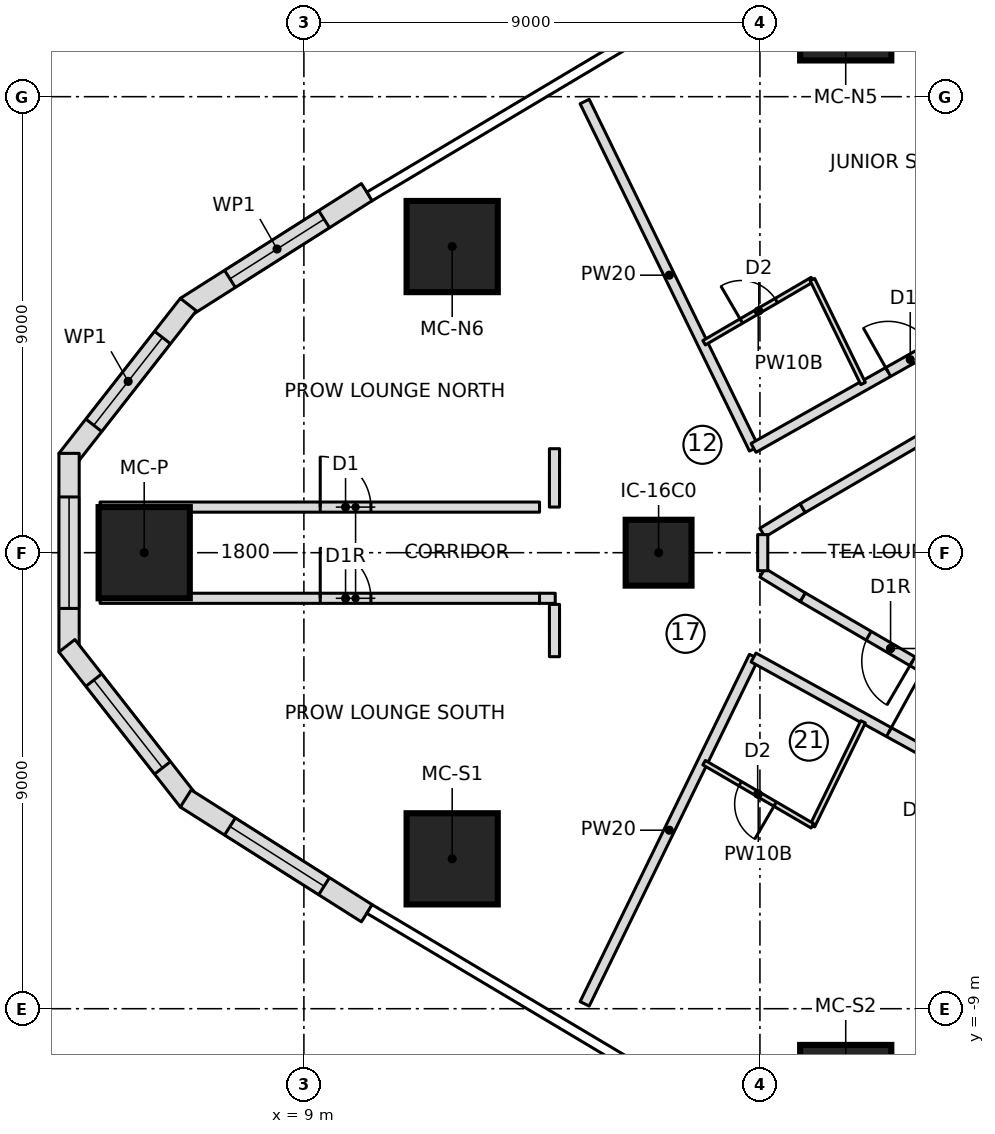
"""IFC4 building model, lengths in metres.
Left out: names, types, materials, properties, quantities, classifications, styles, units other than length and angle.
Written with IfcOpenShell. Run it as: python <this file> out.ifc"""

import sys

from ifc_helpers import new_model, si_unit, direction, frame, frame_2d, origin, origin_2d, place, context, subcontext, project, spatial, polyline, rectangle, outline, extrude, element, fill, save


model = new_model("IFC4")
c1 = context("Model", 3, precision=1e-05, world=origin(), true_north=direction((0.0, 1.0)))
c2 = subcontext(c1, "Body", "Model", "MODEL_VIEW")
j1 = project(units=[si_unit("LENGTHUNIT", "METRE"), si_unit("PLANEANGLEUNIT", "RADIAN")], contexts=[c1])
p1 = place(None, origin())
s1 = spatial("IfcSite", under=j1, at=p1, CompositionType="ELEMENT")
p2 = place(p1, origin())
s2 = spatial("IfcBuilding", under=s1, at=p2, CompositionType="ELEMENT")
p3 = place(p2, frame((0.0, 0.0, 43.15)))
s3 = spatial("IfcBuildingStorey", under=s2, at=p3, CompositionType="ELEMENT", Elevation=43.15)
for number, where, z_axis, x_axis in (
    (1, (5.848, 0.0, 0.0), (0.0, 0.0, 1.0), (1.0, 0.0, 0.0)),
    (2, (11.927, -6.042, 0.0), (0.0, 0.0, 1.0), (1.0, 0.0, 0.0)),
    (3, (19.693, -10.615, 0.0), (0.0, 0.0, 1.0), (1.0, 0.0, 0.0)),
    (4, (19.693, 10.615, 0.0), (0.0, 0.0, 1.0), (1.0, 0.0, 0.0)),
    (5, (11.927, 6.042, 0.0), (0.0, 0.0, 1.0), (1.0, 0.0, 0.0)),
):
    element("IfcColumn", number, at=place(p3, frame(where, z_axis=z_axis, x_axis=x_axis)), inside=s3, PredefinedType="COLUMN", context=c2, shape_type="SweptSolid", body=[
        extrude(rectangle(XDim=1.8, YDim=1.8, at=origin_2d()), origin(), (0.0, 0.0, 1.0), 3.55),
    ])
p4 = place(p3, frame((16.0, 0.0, 0.0), z_axis=(0.0, 0.0, 1.0), x_axis=(1.0, 0.0, 0.0)))
e6 = element("IfcColumn", 6, at=p4, inside=s3, PredefinedType="COLUMN", context=c2, shape_type="SweptSolid", body=[
    extrude(rectangle(XDim=1.3, YDim=1.3, at=origin_2d()), origin(), (0.0, 0.0, 1.0), 3.55),
])
p5 = place(p3, frame((10.242, 7.116, 0.0), z_axis=(0.0, 0.0, 1.0), x_axis=(-0.844551578623, -0.535474211372, 0.0)))
e7 = element("IfcWall", 7, at=p5, inside=s3, PredefinedType="NOTDEFINED", context=c2, shape_type="SweptSolid", body=[
    extrude(outline(polyline([(0.0, -0.2), (4.23, -0.2), (4.162, 0.2), (0.0, 0.2), (0.0, -0.2)])), origin(), (0.0, 0.0, 1.0), 3.25),
])
p6 = place(p5, frame((0.998, 0.0, 0.6)))
e8 = element("IfcOpeningElement", 8, at=p6, cuts=e7, PredefinedType="OPENING", context=c2, shape_type="SweptSolid", body=[
    extrude(outline(polyline([(0.0, 1.35), (0.084, 1.771), (0.322, 2.128), (0.679, 2.366), (1.1, 2.45), (1.521, 2.366), (1.878, 2.128), (2.116, 1.771), (2.2, 1.35), (2.2, 1.1), (2.116, 0.679), (1.878, 0.322), (1.521, 0.084), (1.1, 0.0), (0.679, 0.084), (0.322, 0.322), (0.084, 0.679), (0.0, 1.1), (0.0, 1.35)])), frame((0.0, 0.21, 0.0), z_axis=(0.0, -1.0, 0.0), x_axis=(1.0, 0.0, 0.0)), (0.0, 0.0, 1.0), 0.42),
])
p7 = place(p3, frame((6.698, 4.87, 0.0), z_axis=(0.0, 0.0, 1.0), x_axis=(-0.616586647779, -0.787287054245, 0.0)))
e9 = element("IfcWall", 9, at=p7, inside=s3, PredefinedType="NOTDEFINED", context=c2, shape_type="SweptSolid", body=[
    extrude(outline(polyline([(-0.034, -0.2), (3.852, -0.2), (3.714, 0.2), (0.034, 0.2), (-0.034, -0.2)])), origin(), (0.0, 0.0, 1.0), 3.25),
])
p8 = place(p7, frame((0.792, 0.0, 0.6)))
e10 = element("IfcOpeningElement", 10, at=p8, cuts=e9, PredefinedType="OPENING", context=c2, shape_type="SweptSolid", body=[
    extrude(outline(polyline([(0.0, 1.35), (0.084, 1.771), (0.322, 2.128), (0.679, 2.366), (1.1, 2.45), (1.521, 2.366), (1.878, 2.128), (2.116, 1.771), (2.2, 1.35), (2.2, 1.1), (2.116, 0.679), (1.878, 0.322), (1.521, 0.084), (1.1, 0.0), (0.679, 0.084), (0.322, 0.322), (0.084, 0.679), (0.0, 1.1), (0.0, 1.35)])), frame((0.0, 0.21, 0.0), z_axis=(0.0, -1.0, 0.0), x_axis=(1.0, 0.0, 0.0)), (0.0, 0.0, 1.0), 0.42),
])
p9 = place(p3, frame((4.365, 1.891, 0.0), z_axis=(0.0, 0.0, 1.0), x_axis=(0.0, -1.0, 0.0)))
e11 = element("IfcWall", 11, at=p9, inside=s3, PredefinedType="NOTDEFINED", context=c2, shape_type="SweptSolid", body=[
    extrude(outline(polyline([(-0.069, -0.2), (3.852, -0.2), (3.714, 0.2), (0.069, 0.2), (-0.069, -0.2)])), origin(), (0.0, 0.0, 1.0), 3.25),
])
p10 = place(p9, frame((0.792, 0.0, 0.6)))
e12 = element("IfcOpeningElement", 12, at=p10, cuts=e11, PredefinedType="OPENING", context=c2, shape_type="SweptSolid", body=[
    extrude(outline(polyline([(0.0, 1.35), (0.084, 1.771), (0.322, 2.128), (0.679, 2.366), (1.1, 2.45), (1.521, 2.366), (1.878, 2.128), (2.116, 1.771), (2.2, 1.35), (2.2, 1.1), (2.116, 0.679), (1.878, 0.322), (1.521, 0.084), (1.1, 0.0), (0.679, 0.084), (0.322, 0.322), (0.084, 0.679), (0.0, 1.1), (0.0, 1.35)])), frame((0.0, 0.21, 0.0), z_axis=(0.0, -1.0, 0.0), x_axis=(1.0, 0.0, 0.0)), (0.0, 0.0, 1.0), 0.42),
])
p11 = place(p3, frame((4.365, -1.891, 0.0), z_axis=(0.0, 0.0, 1.0), x_axis=(0.616586647779, -0.787287054245, 0.0)))
e13 = element("IfcWall", 13, at=p11, inside=s3, PredefinedType="NOTDEFINED", context=c2, shape_type="SweptSolid", body=[
    extrude(outline(polyline([(-0.069, -0.2), (3.817, -0.2), (3.749, 0.2), (0.069, 0.2), (-0.069, -0.2)])), origin(), (0.0, 0.0, 1.0), 3.25),
])
p12 = place(p11, frame((0.792, 0.0, 0.6)))
e14 = element("IfcOpeningElement", 14, at=p12, cuts=e13, PredefinedType="OPENING", context=c2, shape_type="SweptSolid", body=[
    extrude(outline(polyline([(0.0, 1.35), (0.084, 1.771), (0.322, 2.128), (0.679, 2.366), (1.1, 2.45), (1.521, 2.366), (1.878, 2.128), (2.116, 1.771), (2.2, 1.35), (2.2, 1.1), (2.116, 0.679), (1.878, 0.322), (1.521, 0.084), (1.1, 0.0), (0.679, 0.084), (0.322, 0.322), (0.084, 0.679), (0.0, 1.1), (0.0, 1.35)])), frame((0.0, 0.21, 0.0), z_axis=(0.0, -1.0, 0.0), x_axis=(1.0, 0.0, 0.0)), (0.0, 0.0, 1.0), 0.42),
])
p13 = place(p3, frame((6.698, -4.87, 0.0), z_axis=(0.0, 0.0, 1.0), x_axis=(0.844551578623, -0.535474211372, 0.0)))
e15 = element("IfcWall", 15, at=p13, inside=s3, PredefinedType="NOTDEFINED", context=c2, shape_type="SweptSolid", body=[
    extrude(outline(polyline([(-0.034, -0.2), (4.196, -0.2), (4.196, 0.2), (0.034, 0.2), (-0.034, -0.2)])), origin(), (0.0, 0.0, 1.0), 3.25),
])
p14 = place(p13, frame((0.998, 0.0, 0.6)))
e16 = element("IfcOpeningElement", 16, at=p14, cuts=e15, PredefinedType="OPENING", context=c2, shape_type="SweptSolid", body=[
    extrude(outline(polyline([(0.0, 1.35), (0.084, 1.771), (0.322, 2.128), (0.679, 2.366), (1.1, 2.45), (1.521, 2.366), (1.878, 2.128), (2.116, 1.771), (2.2, 1.35), (2.2, 1.1), (2.116, 0.679), (1.878, 0.322), (1.521, 0.084), (1.1, 0.0), (0.679, 0.084), (0.322, 0.322), (0.084, 0.679), (0.0, 1.1), (0.0, 1.35)])), frame((0.0, 0.21, 0.0), z_axis=(0.0, -1.0, 0.0), x_axis=(1.0, 0.0, 0.0)), (0.0, 0.0, 1.0), 0.42),
])
p15 = place(p3, frame((17.882, 2.05, 0.0), z_axis=(0.0, 0.0, 1.0), x_axis=(-0.438213564788, 0.898870887078, 0.0)))
e17 = element("IfcWall", 17, at=p15, inside=s3, PredefinedType="PARTITIONING", context=c2, shape_type="SweptSolid", body=[
    extrude(rectangle(XDim=7.625, YDim=0.2, at=frame_2d((3.813, 0.0))), origin(), (0.0, 0.0, 1.0), 3.25),
])
p16 = place(p3, frame((17.874, 2.068, 0.0), z_axis=(0.0, 0.0, 1.0), x_axis=(0.871165632804, 0.490989246544, 0.0)))
e18 = element("IfcWall", 18, at=p16, inside=s3, PredefinedType="PARTITIONING", context=c2, shape_type="SweptSolid", body=[
    extrude(rectangle(XDim=9.901, YDim=0.2, at=frame_2d((4.951, 0.0))), origin(), (0.0, 0.0, 1.0), 3.25),
])
p17 = place(p16, frame((3.05, 0.0, 0.0)))
e19 = element("IfcOpeningElement", 19, at=p17, cuts=e18, PredefinedType="OPENING", context=c2, shape_type="SweptSolid", body=[
    extrude(rectangle(XDim=1.0, YDim=2.1, at=frame_2d((0.5, 1.05))), frame((0.0, 0.11, 0.0), z_axis=(0.0, -1.0, 0.0), x_axis=(1.0, 0.0, 0.0)), (0.0, 0.0, 1.0), 0.22),
])
p18 = place(p3, frame((16.898, 4.144, 0.0), z_axis=(0.0, 0.0, 1.0), x_axis=(0.863707305865, 0.503993739837, 0.0)))
e20 = element("IfcWall", 20, at=p18, inside=s3, PredefinedType="PARTITIONING", context=c2, shape_type="SweptSolid", body=[
    extrude(rectangle(XDim=2.474, YDim=0.1, at=frame_2d((1.237, 0.0))), origin(), (0.0, 0.0, 1.0), 3.25),
])
p19 = place(p18, frame((0.85, 0.0, 0.0)))
e21 = element("IfcOpeningElement", 21, at=p19, cuts=e20, PredefinedType="OPENING", context=c2, shape_type="SweptSolid", body=[
    extrude(rectangle(XDim=0.8, YDim=2.1, at=frame_2d((0.4, 1.05))), frame((0.0, 0.06, 0.0), z_axis=(0.0, -1.0, 0.0), x_axis=(1.0, 0.0, 0.0)), (0.0, 0.0, 1.0), 0.12),
])
p20 = place(p3, frame((19.035, 5.39, 0.0), z_axis=(0.0, 0.0, 1.0), x_axis=(0.438122322582, -0.898915363344, 0.0)))
e22 = element("IfcWall", 22, at=p20, inside=s3, PredefinedType="PARTITIONING", context=c2, shape_type="SweptSolid", body=[
    extrude(rectangle(XDim=2.283, YDim=0.1, at=frame_2d((1.142, 0.0))), origin(), (0.0, 0.0, 1.0), 3.25),
])
p21 = place(p3, frame((14.541, -8.904, 0.0), z_axis=(0.0, 0.0, 1.0), x_axis=(0.438213564788, 0.898870887078, 0.0)))
e23 = element("IfcWall", 23, at=p21, inside=s3, PredefinedType="PARTITIONING", context=c2, shape_type="SweptSolid", body=[
    extrude(rectangle(XDim=7.625, YDim=0.2, at=frame_2d((3.813, 0.0))), origin(), (0.0, 0.0, 1.0), 3.25),
])
p22 = place(p3, frame((17.874, -2.068, 0.0), z_axis=(0.0, 0.0, 1.0), x_axis=(0.875757832755, -0.482750679305, 0.0)))
e24 = element("IfcWall", 24, at=p22, inside=s3, PredefinedType="PARTITIONING", context=c2, shape_type="SweptSolid", body=[
    extrude(rectangle(XDim=14.405, YDim=0.2, at=frame_2d((7.202, 0.0))), origin(), (0.0, 0.0, 1.0), 3.25),
])
p23 = place(p22, frame((3.05, 0.0, 0.0)))
e25 = element("IfcOpeningElement", 25, at=p23, cuts=e24, PredefinedType="OPENING", context=c2, shape_type="SweptSolid", body=[
    extrude(rectangle(XDim=1.5, YDim=2.1, at=frame_2d((0.75, 1.05))), frame((0.0, 0.11, 0.0), z_axis=(0.0, -1.0, 0.0), x_axis=(1.0, 0.0, 0.0)), (0.0, 0.0, 1.0), 0.22),
])
p24 = place(p3, frame((20.035, -3.338, 0.0), z_axis=(0.0, 0.0, 1.0), x_axis=(-0.438122322582, -0.898915363344, 0.0)))
e26 = element("IfcWall", 26, at=p24, inside=s3, PredefinedType="PARTITIONING", context=c2, shape_type="SweptSolid", body=[
    extrude(rectangle(XDim=2.283, YDim=0.1, at=frame_2d((1.142, 0.0))), origin(), (0.0, 0.0, 1.0), 3.25),
])
p25 = place(p3, frame((19.035, -5.39, 0.0), z_axis=(0.0, 0.0, 1.0), x_axis=(-0.863707305865, 0.503993739837, 0.0)))
e27 = element("IfcWall", 27, at=p25, inside=s3, PredefinedType="PARTITIONING", context=c2, shape_type="SweptSolid", body=[
    extrude(rectangle(XDim=2.474, YDim=0.1, at=frame_2d((1.237, 0.0))), origin(), (0.0, 0.0, 1.0), 3.25),
])
p26 = place(p25, frame((0.85, 0.0, 0.0)))
e28 = element("IfcOpeningElement", 28, at=p26, cuts=e27, PredefinedType="OPENING", context=c2, shape_type="SweptSolid", body=[
    extrude(rectangle(XDim=0.8, YDim=2.1, at=frame_2d((0.4, 1.05))), frame((0.0, 0.06, 0.0), z_axis=(0.0, -1.0, 0.0), x_axis=(1.0, 0.0, 0.0)), (0.0, 0.0, 1.0), 0.12),
])
p27 = place(p3, frame((22.312, -2.903, 0.0), z_axis=(0.0, 0.0, 1.0), x_axis=(-0.863710538269, 0.503988200341, 0.0)))
e29 = element("IfcWall", 29, at=p27, inside=s3, PredefinedType="PARTITIONING", context=c2, shape_type="SweptSolid", body=[
    extrude(rectangle(XDim=4.016, YDim=0.2, at=frame_2d((2.008, 0.0))), origin(), (0.0, 0.0, 1.0), 3.25),
])
p28 = place(p27, frame((1.508, 0.0, 0.0)))
e30 = element("IfcOpeningElement", 30, at=p28, cuts=e29, PredefinedType="OPENING", context=c2, shape_type="SweptSolid", body=[
    extrude(rectangle(XDim=1.0, YDim=2.1, at=frame_2d((0.5, 1.05))), frame((0.0, 0.11, 0.0), z_axis=(0.0, -1.0, 0.0), x_axis=(1.0, 0.0, 0.0)), (0.0, 0.0, 1.0), 0.22),
])
for number, where, z_axis, x_axis in (
    (31, (18.844, -0.879, 0.0), (0.0, 0.0, 1.0), (-0.854, 0.52, 0.0)),
    (32, (18.05, 0.396, 0.0), (0.0, 0.0, 1.0), (0.854, 0.52, 0.0)),
):
    element("IfcWall", number, at=place(p3, frame(where, z_axis=z_axis, x_axis=x_axis)), inside=s3, PredefinedType="PARTITIONING", context=c2, shape_type="SweptSolid", body=[
        extrude(rectangle(XDim=0.929, YDim=0.2, at=frame_2d((0.464, 0.0))), origin(), (0.0, 0.0, 1.0), 3.25),
    ])
p29 = place(p3, frame((18.844, 0.879, 0.0), z_axis=(0.0, 0.0, 1.0), x_axis=(0.863710538269, 0.503988200341, 0.0)))
e33 = element("IfcWall", 33, at=p29, inside=s3, PredefinedType="PARTITIONING", context=c2, shape_type="SweptSolid", body=[
    extrude(rectangle(XDim=4.016, YDim=0.2, at=frame_2d((2.008, 0.0))), origin(), (0.0, 0.0, 1.0), 3.25),
])
p30 = place(p3, frame((4.977, 0.9, 0.0), z_axis=(0.0, 0.0, 1.0), x_axis=(1.0, 0.0, 0.0)))
e34 = element("IfcWall", 34, at=p30, inside=s3, PredefinedType="PARTITIONING", context=c2, shape_type="SweptSolid", body=[
    extrude(rectangle(XDim=8.673, YDim=0.2, at=frame_2d((4.336, 0.0))), origin(), (0.0, 0.0, 1.0), 3.25),
])
p31 = place(p30, frame((4.345, 0.0, 0.0)))
e35 = element("IfcOpeningElement", 35, at=p31, cuts=e34, PredefinedType="OPENING", context=c2, shape_type="SweptSolid", body=[
    extrude(rectangle(XDim=1.0, YDim=2.1, at=frame_2d((0.5, 1.05))), frame((0.0, 0.11, 0.0), z_axis=(0.0, -1.0, 0.0), x_axis=(1.0, 0.0, 0.0)), (0.0, 0.0, 1.0), 0.22),
])
p32 = place(p3, frame((4.977, -0.9, 0.0), z_axis=(0.0, 0.0, 1.0), x_axis=(1.0, 0.0, 0.0)))
e36 = element("IfcWall", 36, at=p32, inside=s3, PredefinedType="PARTITIONING", context=c2, shape_type="SweptSolid", body=[
    extrude(rectangle(XDim=8.673, YDim=0.2, at=frame_2d((4.336, 0.0))), origin(), (0.0, 0.0, 1.0), 3.25),
])
p33 = place(p32, frame((4.345, 0.0, 0.0)))
e37 = element("IfcOpeningElement", 37, at=p33, cuts=e36, PredefinedType="OPENING", context=c2, shape_type="SweptSolid", body=[
    extrude(rectangle(XDim=1.0, YDim=2.1, at=frame_2d((0.5, 1.05))), frame((0.0, 0.11, 0.0), z_axis=(0.0, -1.0, 0.0), x_axis=(1.0, 0.0, 0.0)), (0.0, 0.0, 1.0), 0.22),
])
p34 = place(p3, frame((18.055, -0.357, 0.0), z_axis=(0.0, 0.0, 1.0), x_axis=(0.0, 1.0, 0.0)))
e38 = element("IfcWall", 38, at=p34, inside=s3, PredefinedType="PARTITIONING", context=c2, shape_type="SweptSolid", body=[
    extrude(rectangle(XDim=0.713, YDim=0.2, at=frame_2d((0.357, 0.0))), origin(), (0.0, 0.0, 1.0), 3.25),
])
p35 = place(p3, frame((13.946, 2.052, 0.0), z_axis=(0.0, 0.0, 1.0), x_axis=(-0.000423818568, -0.999999910189, 0.0)))
e39 = element("IfcWall", 39, at=p35, inside=s3, PredefinedType="PARTITIONING", context=c2, shape_type="SweptSolid", body=[
    extrude(rectangle(XDim=1.152, YDim=0.2, at=frame_2d((0.576, 0.0))), origin(), (0.0, 0.0, 1.0), 3.25),
])
p36 = place(p3, frame((13.65, -0.9, 0.0), z_axis=(0.0, 0.0, 1.0), x_axis=(0.99999876, -0.001574801197, 0.0)))
e40 = element("IfcWall", 40, at=p36, inside=s3, PredefinedType="PARTITIONING", context=c2, shape_type="SweptSolid", body=[
    extrude(rectangle(XDim=0.31, YDim=0.2, at=frame_2d((0.155, 0.0))), origin(), (0.0, 0.0, 1.0), 3.25),
])
p37 = place(p3, frame((13.945, -1.021, 0.0), z_axis=(0.0, 0.0, 1.0), x_axis=(0.000473148752, -0.999999888065, 0.0)))
e41 = element("IfcWall", 41, at=p37, inside=s3, PredefinedType="PARTITIONING", context=c2, shape_type="SweptSolid", body=[
    extrude(rectangle(XDim=1.032, YDim=0.2, at=frame_2d((0.516, 0.0))), origin(), (0.0, 0.0, 1.0), 3.25),
])
p38 = place(p6, origin())
e42 = element("IfcWindow", 42, at=p38, inside=s3, PartitioningType="SINGLE_PANEL", PredefinedType="WINDOW", context=c2, shape_type="SweptSolid", body=[
    extrude(outline(polyline([(0.0, 1.35), (0.084, 1.771), (0.322, 2.128), (0.679, 2.366), (1.1, 2.45), (1.521, 2.366), (1.878, 2.128), (2.116, 1.771), (2.2, 1.35), (2.2, 1.1), (2.116, 0.679), (1.878, 0.322), (1.521, 0.084), (1.1, 0.0), (0.679, 0.084), (0.322, 0.322), (0.084, 0.679), (0.0, 1.1), (0.0, 1.35)])), frame((0.0, 0.17, 0.0), z_axis=(0.0, -1.0, 0.0), x_axis=(1.0, 0.0, 0.0)), (0.0, 0.0, 1.0), 0.06),
])
fill(e8, e42)
p39 = place(p8, origin())
e43 = element("IfcWindow", 43, at=p39, inside=s3, PartitioningType="SINGLE_PANEL", PredefinedType="WINDOW", context=c2, shape_type="SweptSolid", body=[
    extrude(outline(polyline([(0.0, 1.35), (0.084, 1.771), (0.322, 2.128), (0.679, 2.366), (1.1, 2.45), (1.521, 2.366), (1.878, 2.128), (2.116, 1.771), (2.2, 1.35), (2.2, 1.1), (2.116, 0.679), (1.878, 0.322), (1.521, 0.084), (1.1, 0.0), (0.679, 0.084), (0.322, 0.322), (0.084, 0.679), (0.0, 1.1), (0.0, 1.35)])), frame((0.0, 0.17, 0.0), z_axis=(0.0, -1.0, 0.0), x_axis=(1.0, 0.0, 0.0)), (0.0, 0.0, 1.0), 0.06),
])
fill(e10, e43)
p40 = place(p10, origin())
e44 = element("IfcWindow", 44, at=p40, inside=s3, PartitioningType="SINGLE_PANEL", PredefinedType="WINDOW", context=c2, shape_type="SweptSolid", body=[
    extrude(outline(polyline([(0.0, 1.35), (0.084, 1.771), (0.322, 2.128), (0.679, 2.366), (1.1, 2.45), (1.521, 2.366), (1.878, 2.128), (2.116, 1.771), (2.2, 1.35), (2.2, 1.1), (2.116, 0.679), (1.878, 0.322), (1.521, 0.084), (1.1, 0.0), (0.679, 0.084), (0.322, 0.322), (0.084, 0.679), (0.0, 1.1), (0.0, 1.35)])), frame((0.0, 0.17, 0.0), z_axis=(0.0, -1.0, 0.0), x_axis=(1.0, 0.0, 0.0)), (0.0, 0.0, 1.0), 0.06),
])
fill(e12, e44)
p41 = place(p12, origin())
e45 = element("IfcWindow", 45, at=p41, inside=s3, PartitioningType="SINGLE_PANEL", PredefinedType="WINDOW", context=c2, shape_type="SweptSolid", body=[
    extrude(outline(polyline([(0.0, 1.35), (0.084, 1.771), (0.322, 2.128), (0.679, 2.366), (1.1, 2.45), (1.521, 2.366), (1.878, 2.128), (2.116, 1.771), (2.2, 1.35), (2.2, 1.1), (2.116, 0.679), (1.878, 0.322), (1.521, 0.084), (1.1, 0.0), (0.679, 0.084), (0.322, 0.322), (0.084, 0.679), (0.0, 1.1), (0.0, 1.35)])), frame((0.0, 0.17, 0.0), z_axis=(0.0, -1.0, 0.0), x_axis=(1.0, 0.0, 0.0)), (0.0, 0.0, 1.0), 0.06),
])
fill(e14, e45)
p42 = place(p14, origin())
e46 = element("IfcWindow", 46, at=p42, inside=s3, PartitioningType="SINGLE_PANEL", PredefinedType="WINDOW", context=c2, shape_type="SweptSolid", body=[
    extrude(outline(polyline([(0.0, 1.35), (0.084, 1.771), (0.322, 2.128), (0.679, 2.366), (1.1, 2.45), (1.521, 2.366), (1.878, 2.128), (2.116, 1.771), (2.2, 1.35), (2.2, 1.1), (2.116, 0.679), (1.878, 0.322), (1.521, 0.084), (1.1, 0.0), (0.679, 0.084), (0.322, 0.322), (0.084, 0.679), (0.0, 1.1), (0.0, 1.35)])), frame((0.0, 0.17, 0.0), z_axis=(0.0, -1.0, 0.0), x_axis=(1.0, 0.0, 0.0)), (0.0, 0.0, 1.0), 0.06),
])
fill(e16, e46)
p43 = place(p31, origin())
e47 = element("IfcDoor", 47, at=p43, inside=s3, OperationType="SINGLE_SWING_LEFT", PredefinedType="DOOR", context=c2, shape_type="SweptSolid", body=[
    extrude(rectangle(XDim=1.0, YDim=2.1, at=frame_2d((0.5, 1.05))), frame((0.0, 0.025, 0.0), z_axis=(0.0, -1.0, 0.0), x_axis=(1.0, 0.0, 0.0)), (0.0, 0.0, 1.0), 0.05),
])
fill(e35, e47)
p44 = place(p33, origin())
e48 = element("IfcDoor", 48, at=p44, inside=s3, OperationType="SINGLE_SWING_RIGHT", PredefinedType="DOOR", context=c2, shape_type="SweptSolid", body=[
    extrude(rectangle(XDim=1.0, YDim=2.1, at=frame_2d((0.5, 1.05))), frame((0.0, 0.025, 0.0), z_axis=(0.0, -1.0, 0.0), x_axis=(1.0, 0.0, 0.0)), (0.0, 0.0, 1.0), 0.05),
])
fill(e37, e48)
p45 = place(p19, origin())
e49 = element("IfcDoor", 49, at=p45, inside=s3, OperationType="SINGLE_SWING_LEFT", PredefinedType="DOOR", context=c2, shape_type="SweptSolid", body=[
    extrude(rectangle(XDim=0.8, YDim=2.1, at=frame_2d((0.4, 1.05))), frame((0.0, 0.025, 0.0), z_axis=(0.0, -1.0, 0.0), x_axis=(1.0, 0.0, 0.0)), (0.0, 0.0, 1.0), 0.05),
])
fill(e21, e49)
p46 = place(p17, origin())
e50 = element("IfcDoor", 50, at=p46, inside=s3, OperationType="SINGLE_SWING_RIGHT", PredefinedType="DOOR", context=c2, shape_type="SweptSolid", body=[
    extrude(rectangle(XDim=1.0, YDim=2.1, at=frame_2d((0.5, 1.05))), frame((0.0, 0.025, 0.0), z_axis=(0.0, -1.0, 0.0), x_axis=(1.0, 0.0, 0.0)), (0.0, 0.0, 1.0), 0.05),
])
fill(e19, e50)
p47 = place(p26, origin())
e51 = element("IfcDoor", 51, at=p47, inside=s3, OperationType="SINGLE_SWING_LEFT", PredefinedType="DOOR", context=c2, shape_type="SweptSolid", body=[
    extrude(rectangle(XDim=0.8, YDim=2.1, at=frame_2d((0.4, 1.05))), frame((0.0, 0.025, 0.0), z_axis=(0.0, -1.0, 0.0), x_axis=(1.0, 0.0, 0.0)), (0.0, 0.0, 1.0), 0.05),
])
fill(e28, e51)
p48 = place(p23, origin())
e52 = element("IfcDoor", 52, at=p48, inside=s3, OperationType="DOUBLE_DOOR_SINGLE_SWING", PredefinedType="DOOR", context=c2, shape_type="SweptSolid", body=[
    extrude(rectangle(XDim=1.5, YDim=2.1, at=frame_2d((0.75, 1.05))), frame((0.0, 0.025, 0.0), z_axis=(0.0, -1.0, 0.0), x_axis=(1.0, 0.0, 0.0)), (0.0, 0.0, 1.0), 0.05),
])
fill(e25, e52)
p49 = place(p28, origin())
e53 = element("IfcDoor", 53, at=p49, inside=s3, OperationType="SINGLE_SWING_RIGHT", PredefinedType="DOOR", context=c2, shape_type="SweptSolid", body=[
    extrude(rectangle(XDim=1.0, YDim=2.1, at=frame_2d((0.5, 1.05))), frame((0.0, 0.025, 0.0), z_axis=(0.0, -1.0, 0.0), x_axis=(1.0, 0.0, 0.0)), (0.0, 0.0, 1.0), 0.05),
])
fill(e30, e53)
save(model, sys.argv[1])
